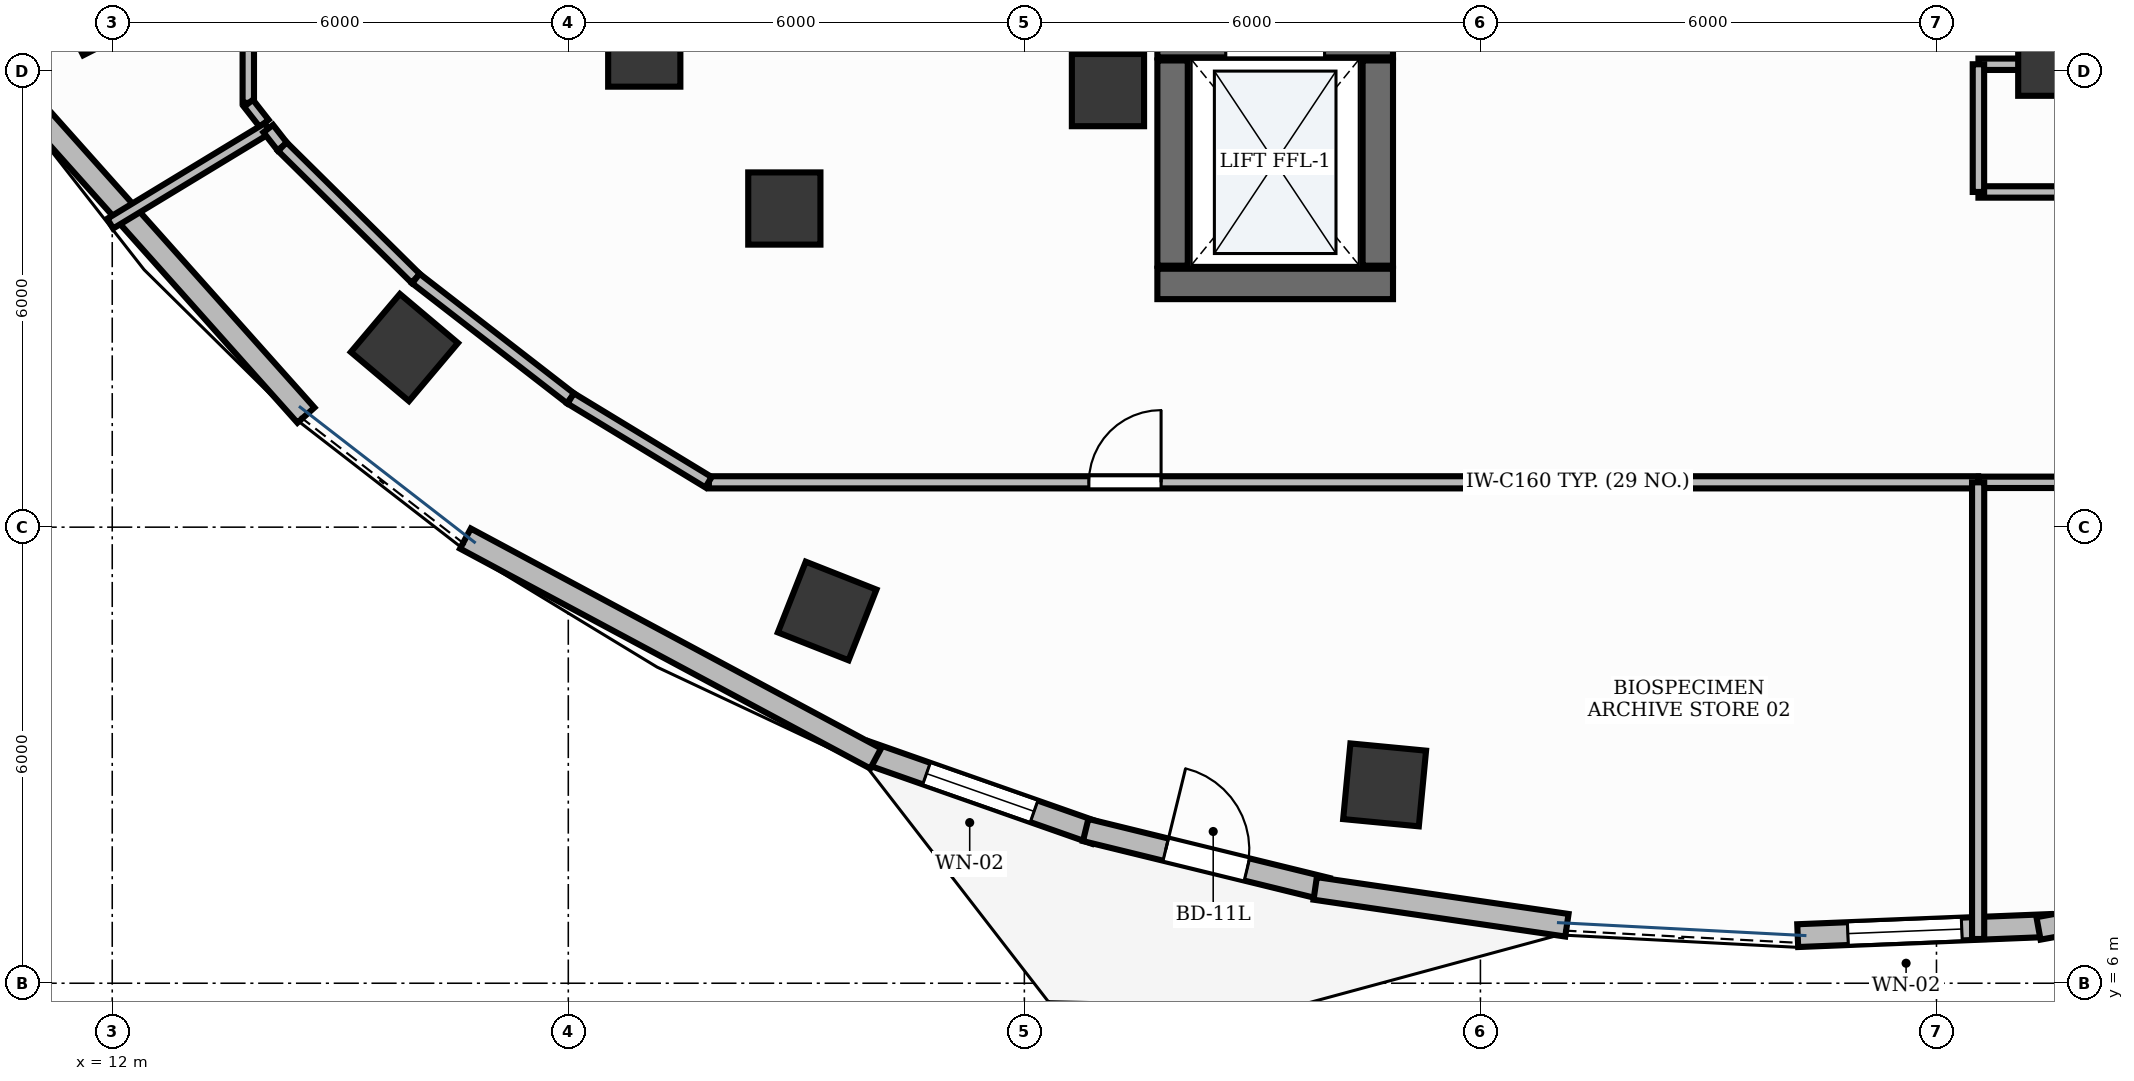
"""IFC4 building model, lengths in metres.
Left out: names, types, materials, properties, quantities, classifications, styles, units other than length and angle.
Written with IfcOpenShell. Run it as: python <this file> out.ifc"""

import sys

from ifc_helpers import new_model, si_unit, direction, frame, frame_2d, origin, origin_2d, place, context, subcontext, project, spatial, rectangle, extrude, element, fill, save


model = new_model("IFC4")
c1 = context("Model", 3, precision=1e-05, world=origin(), true_north=direction((0.0, 1.0)))
c2 = subcontext(c1, "Body", "Model", "MODEL_VIEW")
j1 = project(units=[si_unit("LENGTHUNIT", "METRE"), si_unit("PLANEANGLEUNIT", "RADIAN")], contexts=[c1])
p1 = place(None, origin())
s1 = spatial("IfcSite", under=j1, at=p1, CompositionType="ELEMENT")
p2 = place(p1, origin())
s2 = spatial("IfcBuilding", under=s1, at=p2, CompositionType="ELEMENT")
p3 = place(p2, frame((0.0, 0.0, 175.2)))
s3 = spatial("IfcBuildingStorey", under=s2, at=p3, CompositionType="ELEMENT", Elevation=175.2)
p4 = place(p3, frame((25.75, 15.2, 0.0), z_axis=(0.0, 0.0, 1.0), x_axis=(1.0, 0.0, 0.0)))
e1 = element("IfcWall", 1, at=p4, inside=s3, PredefinedType="SHEAR", context=c2, shape_type="SweptSolid", body=[
    extrude(rectangle(XDim=3.1, YDim=0.4, at=frame_2d((1.55, 0.0))), origin(), (0.0, 0.0, 1.0), 3.9),
])
p5 = place(p3, frame((25.75, 18.38, 0.0), z_axis=(0.0, 0.0, 1.0), x_axis=(1.0, 0.0, 0.0)))
e2 = element("IfcWall", 2, at=p5, inside=s3, PredefinedType="SHEAR", context=c2, shape_type="SweptSolid", body=[
    extrude(rectangle(XDim=3.1, YDim=0.4, at=frame_2d((1.55, 0.0))), origin(), (0.0, 0.0, 1.0), 3.9),
])
p6 = place(p5, frame((0.9, 0.0, 0.0)))
e3 = element("IfcOpeningElement", 3, at=p6, cuts=e2, PredefinedType="OPENING", context=c2, shape_type="SweptSolid", body=[
    extrude(rectangle(XDim=1.3, YDim=2.2, at=frame_2d((0.65, 1.1))), frame((0.0, 0.215, 0.0), z_axis=(0.0, -1.0, 0.0), x_axis=(1.0, 0.0, 0.0)), (0.0, 0.0, 1.0), 0.43),
])
for number, where, z_axis, x_axis in (
    (4, (25.95, 15.44, 0.0), (0.0, 0.0, 1.0), (0.0, 1.0, 0.0)),
    (5, (28.65, 15.44, 0.0), (0.0, 0.0, 1.0), (0.0, 1.0, 0.0)),
):
    element("IfcWall", number, at=place(p3, frame(where, z_axis=z_axis, x_axis=x_axis)), inside=s3, PredefinedType="SHEAR", context=c2, shape_type="SweptSolid", body=[
        extrude(rectangle(XDim=2.7, YDim=0.4, at=frame_2d((1.35, 0.0))), origin(), (0.0, 0.0, 1.0), 3.9),
    ])
for number, where, z_axis, x_axis in (
    (6, (25.1, 17.75, -0.0), (0.0, 0.0, 1.0), (1.0, 0.0, 0.0)),
    (7, (37.55, 18.15, -0.0), (0.0, 0.0, 1.0), (1.0, 0.0, 0.0)),
):
    element("IfcColumn", number, at=place(p3, frame(where, z_axis=z_axis, x_axis=x_axis)), inside=s3, PredefinedType="PILASTER", context=c2, shape_type="SweptSolid", body=[
        extrude(rectangle(XDim=0.95, YDim=0.95, at=origin_2d()), origin(), (0.0, 0.0, 1.0), 3.901),
    ])
p7 = place(p3, frame((11.838, 18.881, -0.0), z_axis=(0.0, 0.0, 1.0), x_axis=(-0.453057191132, 0.891481453292, 0.0)))
e8 = element("IfcColumn", 8, at=p7, inside=s3, PredefinedType="COLUMN", context=c2, shape_type="SweptSolid", body=[
    extrude(rectangle(XDim=1.0, YDim=1.0, at=origin_2d()), origin(), (0.0, 0.0, 1.0), 3.901),
])
p8 = place(p3, frame((19.0, 18.27, -0.0), z_axis=(0.0, 0.0, 1.0), x_axis=(1.0, 0.0, 0.0)))
e9 = element("IfcColumn", 9, at=p8, inside=s3, PredefinedType="COLUMN", context=c2, shape_type="SweptSolid", body=[
    extrude(rectangle(XDim=0.95, YDim=0.95, at=origin_2d()), origin(), (0.0, 0.0, 1.0), 3.901),
])
p9 = place(p3, frame((15.844, 14.363, -0.0), z_axis=(0.0, 0.0, 1.0), x_axis=(-0.764246456939, 0.644924300253, 0.0)))
e10 = element("IfcColumn", 10, at=p9, inside=s3, PredefinedType="COLUMN", context=c2, shape_type="SweptSolid", body=[
    extrude(rectangle(XDim=1.0, YDim=1.0, at=origin_2d()), origin(), (0.0, 0.0, 1.0), 3.901),
])
p10 = place(p3, frame((20.842, 16.192, -0.0), z_axis=(0.0, 0.0, 1.0), x_axis=(1.0, 0.0, 0.0)))
e11 = element("IfcColumn", 11, at=p10, inside=s3, PredefinedType="COLUMN", context=c2, shape_type="SweptSolid", body=[
    extrude(rectangle(XDim=0.95, YDim=0.95, at=origin_2d()), origin(), (0.0, 0.0, 1.0), 3.901),
])
for number, where, z_axis, x_axis in (
    (12, (21.406, 10.897, -0.0), (0.0, 0.0, 1.0), (-0.93, 0.367, 0.0)),
    (13, (28.74, 8.61, -0.0), (0.0, 0.0, 1.0), (-0.995, 0.095, 0.0)),
):
    element("IfcColumn", number, at=place(p3, frame(where, z_axis=z_axis, x_axis=x_axis)), inside=s3, PredefinedType="COLUMN", context=c2, shape_type="SweptSolid", body=[
        extrude(rectangle(XDim=1.0, YDim=1.0, at=origin_2d()), origin(), (0.0, 0.0, 1.0), 3.901),
    ])
p11 = place(p3, frame((21.904, 9.042, 0.0), z_axis=(0.0, 0.0, 1.0), x_axis=(0.943495444321, -0.331385495377, 0.0)))
e14 = element("IfcWall", 14, at=p11, inside=s3, PredefinedType="STANDARD", context=c2, shape_type="SweptSolid", body=[
    extrude(rectangle(XDim=3.214, YDim=0.3, at=frame_2d((1.607, 0.0))), origin(), (0.0, 0.0, 1.0), 3.47),
])
p12 = place(p11, frame((0.857, 0.0, 0.95)))
e15 = element("IfcOpeningElement", 15, at=p12, cuts=e14, PredefinedType="OPENING", context=c2, shape_type="SweptSolid", body=[
    extrude(rectangle(XDim=1.5, YDim=1.8, at=frame_2d((0.75, 0.9))), frame((0.0, 0.165, 0.0), z_axis=(0.0, -1.0, 0.0), x_axis=(1.0, 0.0, 0.0)), (0.0, 0.0, 1.0), 0.33),
])
p13 = place(p3, frame((24.807, 8.016, 0.0), z_axis=(0.0, 0.0, 1.0), x_axis=(0.971312804689, -0.237805457142, 0.0)))
e16 = element("IfcWall", 16, at=p13, inside=s3, PredefinedType="STANDARD", context=c2, shape_type="SweptSolid", body=[
    extrude(rectangle(XDim=3.269, YDim=0.3, at=frame_2d((1.634, 0.0))), origin(), (0.0, 0.0, 1.0), 3.9),
])
p14 = place(p13, frame((1.084, 0.0, 0.0)))
e17 = element("IfcOpeningElement", 17, at=p14, cuts=e16, PredefinedType="OPENING", context=c2, shape_type="SweptSolid", body=[
    extrude(rectangle(XDim=1.1, YDim=2.15, at=frame_2d((0.55, 1.075))), frame((0.0, 0.165, 0.0), z_axis=(0.0, -1.0, 0.0), x_axis=(1.0, 0.0, 0.0)), (0.0, 0.0, 1.0), 0.33),
])
p15 = place(p3, frame((34.174, 6.626, 0.0), z_axis=(0.0, 0.0, 1.0), x_axis=(0.999191674443, 0.040199474165, 0.0)))
e18 = element("IfcWall", 18, at=p15, inside=s3, PredefinedType="STANDARD", context=c2, shape_type="SweptSolid", body=[
    extrude(rectangle(XDim=3.328, YDim=0.3, at=frame_2d((1.664, 0.0))), origin(), (0.0, 0.0, 1.0), 3.9),
])
p16 = place(p15, frame((0.66, 0.0, 0.95)))
e19 = element("IfcOpeningElement", 19, at=p16, cuts=e18, PredefinedType="OPENING", context=c2, shape_type="SweptSolid", body=[
    extrude(rectangle(XDim=1.5, YDim=1.8, at=frame_2d((0.75, 0.9))), frame((0.0, 0.165, 0.0), z_axis=(0.0, -1.0, 0.0), x_axis=(1.0, 0.0, 0.0)), (0.0, 0.0, 1.0), 0.33),
])
p17 = place(p3, frame((10.817, 17.655, 0.0), z_axis=(0.0, 0.0, 1.0), x_axis=(0.665771576384, -0.74615561921, 0.0)))
e20 = element("IfcWall", 20, at=p17, inside=s3, PredefinedType="STANDARD", context=c2, shape_type="SweptSolid", body=[
    extrude(rectangle(XDim=5.604, YDim=0.3, at=frame_2d((2.802, 0.0))), origin(), (0.0, 0.0, 1.0), 3.9),
])
p18 = place(p3, frame((16.647, 11.85, 0.0), z_axis=(0.0, 0.0, 1.0), x_axis=(0.881364369565, -0.472437136624, 0.0)))
e21 = element("IfcWall", 21, at=p18, inside=s3, PredefinedType="STANDARD", context=c2, shape_type="SweptSolid", body=[
    extrude(rectangle(XDim=6.124, YDim=0.3, at=frame_2d((3.062, 0.0))), origin(), (0.0, 0.0, 1.0), 3.47),
])
p19 = place(p3, frame((27.826, 7.247, 0.0), z_axis=(0.0, 0.0, 1.0), x_axis=(0.98945927954, -0.144811374319, 0.0)))
e22 = element("IfcWall", 22, at=p19, inside=s3, PredefinedType="STANDARD", context=c2, shape_type="SweptSolid", body=[
    extrude(rectangle(XDim=3.346, YDim=0.3, at=frame_2d((1.673, 0.0))), origin(), (0.0, 0.0, 1.0), 3.47),
])
p20 = place(p3, frame((37.342, 6.721, 0.0), z_axis=(0.0, 0.0, 1.0), x_axis=(0.983808533342, 0.179222681945, 0.0)))
e23 = element("IfcWall", 23, at=p20, inside=s3, PredefinedType="STANDARD", context=c2, shape_type="SweptSolid", body=[
    extrude(rectangle(XDim=6.498, YDim=0.3, at=frame_2d((3.249, 0.0))), origin(), (0.0, 0.0, 1.0), 3.9),
])
p21 = place(p3, frame((13.79, 28.39, 0.0), z_axis=(0.0, 0.0, 1.0), x_axis=(0.0, -1.0, 0.0)))
e24 = element("IfcWall", 24, at=p21, inside=s3, PredefinedType="PARTITIONING", context=c2, shape_type="SweptSolid", body=[
    extrude(rectangle(XDim=10.807, YDim=0.15, at=frame_2d((5.404, 0.0))), origin(), (0.0, 0.0, 1.0), 2.91),
])
p22 = place(p21, frame((3.192, 0.0, 0.0)))
e25 = element("IfcOpeningElement", 25, at=p22, cuts=e24, PredefinedType="OPENING", context=c2, shape_type="SweptSolid", body=[
    extrude(rectangle(XDim=0.95, YDim=2.15, at=frame_2d((0.475, 1.075))), frame((0.0, 0.09, 0.0), z_axis=(0.0, -1.0, 0.0), x_axis=(1.0, 0.0, 0.0)), (0.0, 0.0, 1.0), 0.18),
])
p23 = place(p3, frame((19.85, 12.59, 0.0), z_axis=(0.0, 0.0, 1.0), x_axis=(1.0, 0.0, 0.0)))
e26 = element("IfcWall", 26, at=p23, inside=s3, PredefinedType="PARTITIONING", context=c2, shape_type="SweptSolid", body=[
    extrude(rectangle(XDim=16.698, YDim=0.16, at=frame_2d((8.349, 0.0))), origin(), (0.0, 0.0, 1.0), 2.91),
])
p24 = place(p23, frame((4.999, 0.0, 0.0)))
e27 = element("IfcOpeningElement", 27, at=p24, cuts=e26, PredefinedType="OPENING", context=c2, shape_type="SweptSolid", body=[
    extrude(rectangle(XDim=0.95, YDim=2.15, at=frame_2d((0.475, 1.075))), frame((0.0, 0.095, 0.0), z_axis=(0.0, -1.0, 0.0), x_axis=(1.0, 0.0, 0.0)), (0.0, 0.0, 1.0), 0.19),
])
p25 = place(p3, frame((36.558, 12.59, 0.0), z_axis=(0.0, 0.0, 1.0), x_axis=(1.0, 0.0, 0.0)))
e28 = element("IfcWall", 28, at=p25, inside=s3, PredefinedType="PARTITIONING", context=c2, shape_type="SweptSolid", body=[
    extrude(rectangle(XDim=7.942, YDim=0.15, at=frame_2d((3.971, 0.0))), origin(), (0.0, 0.0, 1.0), 2.91),
])
p26 = place(p25, frame((6.752, 0.0, 0.0)))
e29 = element("IfcOpeningElement", 29, at=p26, cuts=e28, PredefinedType="OPENING", context=c2, shape_type="SweptSolid", body=[
    extrude(rectangle(XDim=0.95, YDim=2.15, at=frame_2d((0.475, 1.075))), frame((0.0, 0.09, 0.0), z_axis=(0.0, -1.0, 0.0), x_axis=(1.0, 0.0, 0.0)), (0.0, 0.0, 1.0), 0.18),
])
p27 = place(p3, frame((44.5, 16.41, 0.0), z_axis=(0.0, 0.0, 1.0), x_axis=(-1.0, 0.0, 0.0)))
e30 = element("IfcWall", 30, at=p27, inside=s3, PredefinedType="PARTITIONING", context=c2, shape_type="SweptSolid", body=[
    extrude(rectangle(XDim=7.948, YDim=0.15, at=frame_2d((3.974, 0.0))), origin(), (0.0, 0.0, 1.0), 2.91),
])
p28 = place(p27, frame((4.449, 0.0, 0.0)))
e31 = element("IfcOpeningElement", 31, at=p28, cuts=e30, PredefinedType="OPENING", context=c2, shape_type="SweptSolid", body=[
    extrude(rectangle(XDim=0.95, YDim=2.15, at=frame_2d((0.475, 1.075))), frame((0.0, 0.09, 0.0), z_axis=(0.0, -1.0, 0.0), x_axis=(1.0, 0.0, 0.0)), (0.0, 0.0, 1.0), 0.18),
])
p29 = place(p3, frame((13.792, 17.576, 0.0), z_axis=(0.0, 0.0, 1.0), x_axis=(0.61611141045, -0.78765901881, 0.0)))
e32 = element("IfcWall", 32, at=p29, inside=s3, PredefinedType="PARTITIONING", context=c2, shape_type="SweptSolid", body=[
    extrude(rectangle(XDim=0.334, YDim=0.15, at=frame_2d((0.167, 0.0))), origin(), (0.0, 0.0, 1.0), 2.91),
])
p30 = place(p3, frame((14.046, 17.251, 0.0), z_axis=(0.0, 0.0, 1.0), x_axis=(-0.854959737725, -0.518694367494, 0.0)))
e33 = element("IfcWall", 33, at=p30, inside=s3, PredefinedType="PARTITIONING", context=c2, shape_type="SweptSolid", body=[
    extrude(rectangle(XDim=2.425, YDim=0.15, at=frame_2d((1.212, 0.0))), origin(), (0.0, 0.0, 1.0), 2.91),
])
p31 = place(p3, frame((14.052, 17.243, 0.0), z_axis=(0.0, 0.0, 1.0), x_axis=(0.615628260214, -0.788036702969, 0.0)))
e34 = element("IfcWall", 34, at=p31, inside=s3, PredefinedType="PARTITIONING", context=c2, shape_type="SweptSolid", body=[
    extrude(rectangle(XDim=0.3, YDim=0.16, at=frame_2d((0.15, 0.0))), origin(), (0.0, 0.0, 1.0), 2.91),
])
p32 = place(p3, frame((14.238, 17.006, 0.0), z_axis=(0.0, 0.0, 1.0), x_axis=(0.711447157113, -0.702739598027, 0.0)))
e35 = element("IfcWall", 35, at=p32, inside=s3, PredefinedType="PARTITIONING", context=c2, shape_type="SweptSolid", body=[
    extrude(rectangle(XDim=2.467, YDim=0.16, at=frame_2d((1.234, 0.0))), origin(), (0.0, 0.0, 1.0), 2.91),
])
p33 = place(p3, frame((15.995, 15.271, 0.0), z_axis=(0.0, 0.0, 1.0), x_axis=(0.790550458789, -0.61239690733, 0.0)))
e36 = element("IfcWall", 36, at=p33, inside=s3, PredefinedType="PARTITIONING", context=c2, shape_type="SweptSolid", body=[
    extrude(rectangle(XDim=2.575, YDim=0.16, at=frame_2d((1.288, 0.0))), origin(), (0.0, 0.0, 1.0), 2.91),
])
p34 = place(p3, frame((18.031, 13.694, 0.0), z_axis=(0.0, 0.0, 1.0), x_axis=(0.85454497186, -0.51937740716, 0.0)))
e37 = element("IfcWall", 37, at=p34, inside=s3, PredefinedType="PARTITIONING", context=c2, shape_type="SweptSolid", body=[
    extrude(rectangle(XDim=2.122, YDim=0.16, at=frame_2d((1.061, 0.0))), origin(), (0.0, 0.0, 1.0), 2.91),
])
p35 = place(p3, frame((36.548, 12.59, 0.0), z_axis=(0.0, 0.0, 1.0), x_axis=(0.0, -1.0, 0.0)))
e38 = element("IfcWall", 38, at=p35, inside=s3, PredefinedType="PARTITIONING", context=c2, shape_type="SweptSolid", body=[
    extrude(rectangle(XDim=6.008, YDim=0.16, at=frame_2d((3.004, 0.0))), origin(), (0.0, 0.0, 1.0), 2.91),
])
p36 = place(p3, frame((36.552, 18.09, 0.0), z_axis=(0.0, 0.0, 1.0), x_axis=(1.0, 0.0, 0.0)))
e39 = element("IfcWall", 39, at=p36, inside=s3, PredefinedType="PARTITIONING", context=c2, shape_type="SweptSolid", body=[
    extrude(rectangle(XDim=0.798, YDim=0.15, at=frame_2d((0.399, 0.0))), origin(), (0.0, 0.0, 1.0), 2.91),
])
p37 = place(p3, frame((37.36, 18.1, 0.0), z_axis=(0.0, 0.0, 1.0), x_axis=(0.0, 1.0, 0.0)))
e40 = element("IfcWall", 40, at=p37, inside=s3, PredefinedType="PARTITIONING", context=c2, shape_type="SweptSolid", body=[
    extrude(rectangle(XDim=7.248, YDim=0.15, at=frame_2d((3.624, 0.0))), origin(), (0.0, 0.0, 1.0), 2.91),
])
p38 = place(p3, frame((36.552, 16.41, 0.0), z_axis=(0.0, 0.0, 1.0), x_axis=(0.0, 1.0, 0.0)))
e41 = element("IfcWall", 41, at=p38, inside=s3, PredefinedType="PARTITIONING", context=c2, shape_type="SweptSolid", body=[
    extrude(rectangle(XDim=1.68, YDim=0.15, at=frame_2d((0.84, 0.0))), origin(), (0.0, 0.0, 1.0), 2.91),
])
p39 = place(p12, origin())
e42 = element("IfcWindow", 42, at=p39, inside=s3, PartitioningType="DOUBLE_PANEL_VERTICAL", PredefinedType="WINDOW", context=c2, shape_type="SweptSolid", body=[
    extrude(rectangle(XDim=1.5, YDim=1.8, at=frame_2d((0.75, 0.9))), frame((0.0, 0.03, 0.0), z_axis=(0.0, -1.0, 0.0), x_axis=(1.0, 0.0, 0.0)), (0.0, 0.0, 1.0), 0.06),
])
fill(e15, e42)
p40 = place(p14, origin())
e43 = element("IfcDoor", 43, at=p40, inside=s3, OperationType="SINGLE_SWING_LEFT", PredefinedType="DOOR", context=c2, shape_type="SweptSolid", body=[
    extrude(rectangle(XDim=1.1, YDim=2.15, at=frame_2d((0.55, 1.075))), frame((0.0, 0.025, 0.0), z_axis=(0.0, -1.0, 0.0), x_axis=(1.0, 0.0, 0.0)), (0.0, 0.0, 1.0), 0.05),
])
fill(e17, e43)
p41 = place(p16, origin())
e44 = element("IfcWindow", 44, at=p41, inside=s3, PartitioningType="DOUBLE_PANEL_VERTICAL", PredefinedType="WINDOW", context=c2, shape_type="SweptSolid", body=[
    extrude(rectangle(XDim=1.5, YDim=1.8, at=frame_2d((0.75, 0.9))), frame((0.0, 0.03, 0.0), z_axis=(0.0, -1.0, 0.0), x_axis=(1.0, 0.0, 0.0)), (0.0, 0.0, 1.0), 0.06),
])
fill(e19, e44)
p42 = place(p24, origin())
e45 = element("IfcDoor", 45, at=p42, inside=s3, OperationType="SINGLE_SWING_RIGHT", PredefinedType="DOOR", context=c2, shape_type="SweptSolid", body=[
    extrude(rectangle(XDim=0.95, YDim=2.15, at=frame_2d((0.475, 1.075))), frame((0.0, 0.025, 0.0), z_axis=(0.0, -1.0, 0.0), x_axis=(1.0, 0.0, 0.0)), (0.0, 0.0, 1.0), 0.05),
])
fill(e27, e45)
save(model, sys.argv[1])
